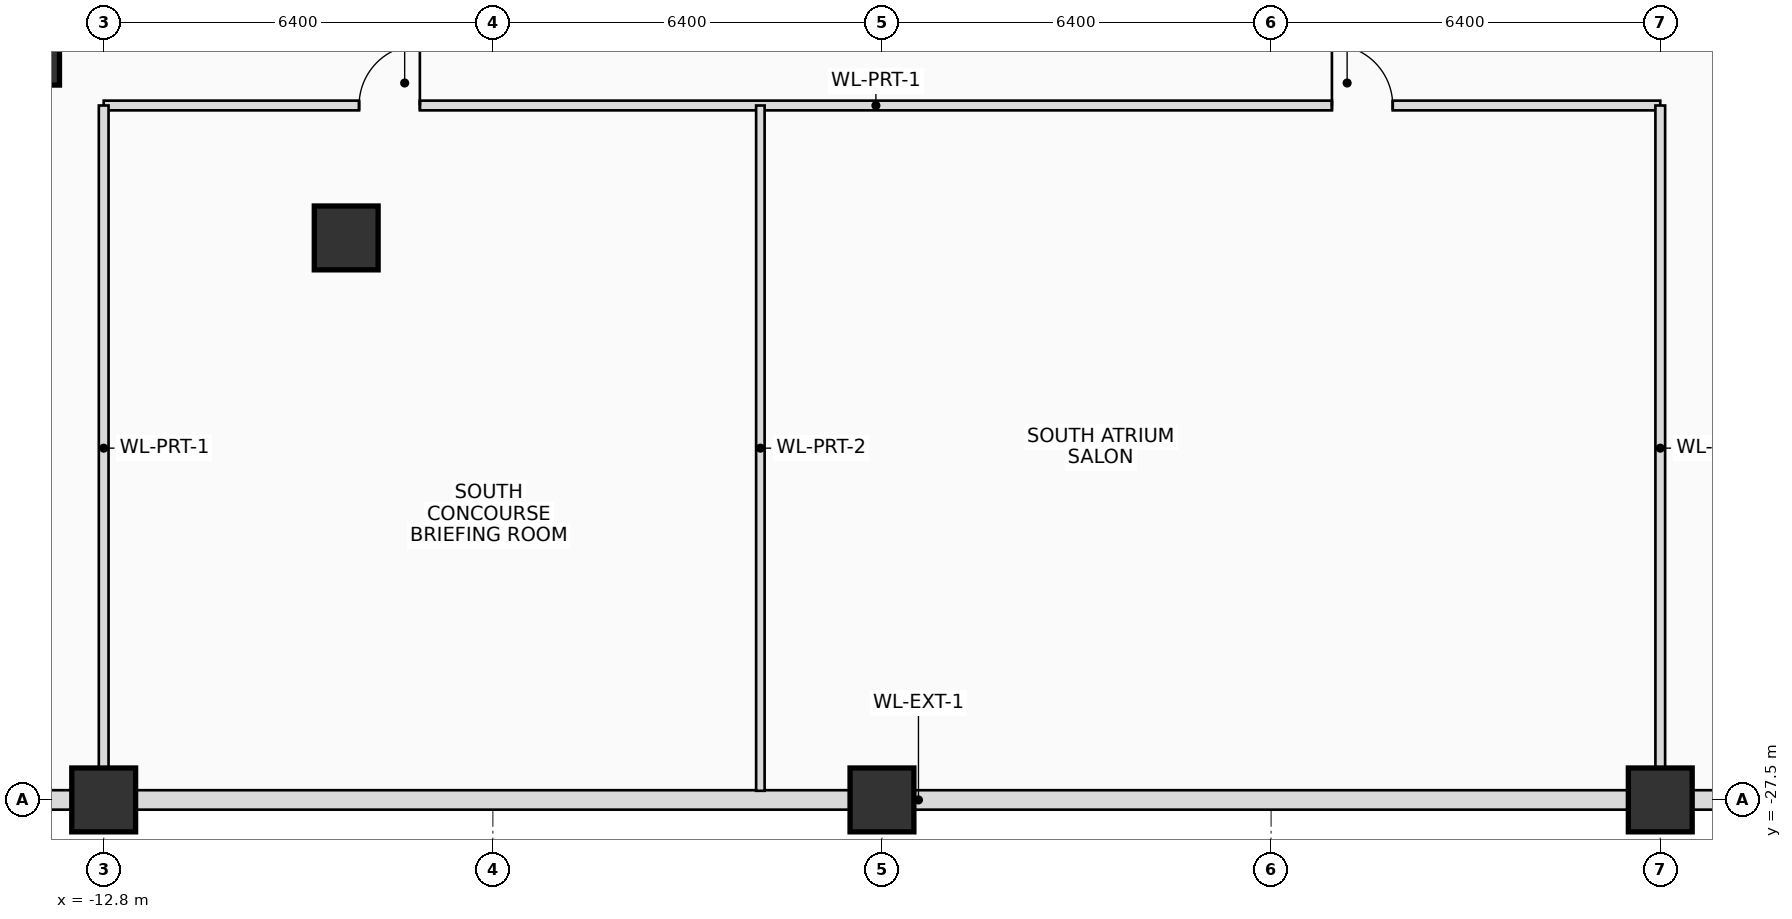
"""IFC4 building model, lengths in metres.
Left out: names, types, materials, properties, quantities, classifications, styles, units other than length and angle.
Written with IfcOpenShell. Run it as: python <this file> out.ifc"""

import sys

from ifc_helpers import new_model, si_unit, direction, frame, frame_2d, origin, origin_2d, place, context, subcontext, project, spatial, rectangle, extrude, source, transform, mapped, element, fill, save


model = new_model("IFC4")
c1 = context("Model", 3, precision=1e-05, world=origin(), true_north=direction((0.0, 1.0)))
c2 = subcontext(c1, "Body", "Model", "MODEL_VIEW")
j1 = project(units=[si_unit("LENGTHUNIT", "METRE"), si_unit("PLANEANGLEUNIT", "RADIAN")], contexts=[c1])
p1 = place(None, origin())
s1 = spatial("IfcSite", under=j1, at=p1, CompositionType="ELEMENT")
p2 = place(p1, origin())
s2 = spatial("IfcBuilding", under=s1, at=p2, CompositionType="ELEMENT")
p3 = place(p2, frame((0.0, 0.0, 4.5)))
s3 = spatial("IfcBuildingStorey", under=s2, at=p3, CompositionType="ELEMENT", Elevation=4.5)
m1 = source(origin(), c2, "Body", "SweptSolid", [
    extrude(rectangle(XDim=1.05, YDim=1.05, at=origin_2d()), origin(), (0.0, 0.0, 1.0), 3.9),
])
for number, where, z_axis, x_axis in (
    (1, (-12.8, -27.5, 0.0), (0.0, 0.0, 1.0), (1.0, 0.0, 0.0)),
    (2, (0.0, -27.5, 0.0), (0.0, 0.0, 1.0), (1.0, 0.0, 0.0)),
    (3, (12.8, -27.5, 0.0), (0.0, 0.0, 1.0), (1.0, 0.0, 0.0)),
    (4, (-8.812, -18.258, 0.0), (0.0, 0.0, 1.0), (1.0, 0.0, 0.0)),
    (5, (-14.052, -15.219, 0.0), (0.0, 0.0, 1.0), (1.0, 0.0, 0.0)),
):
    element("IfcColumn", number, at=place(p3, frame(where, z_axis=z_axis, x_axis=x_axis)), inside=s3, PredefinedType="COLUMN", context=c2, shape_type="MappedRepresentation", body=[
        mapped(m1, transform((0.0, 0.0, 0.0), scale=1.0)),
    ])
p4 = place(p3, frame((34.0, -27.5, 0.0), z_axis=(0.0, 0.0, 1.0), x_axis=(-1.0, 0.0, 0.0)))
e6 = element("IfcWall", 6, at=p4, inside=s3, PredefinedType="SOLIDWALL", context=c2, shape_type="SweptSolid", body=[
    extrude(rectangle(XDim=68.0, YDim=0.32, at=frame_2d((34.0, 0.0))), origin(), (0.0, 0.0, 1.0), 2.65),
])
p5 = place(p4, frame((16.0, 0.0, 0.65)))
e7 = element("IfcOpeningElement", 7, at=p5, cuts=e6, PredefinedType="OPENING", context=c2, shape_type="SweptSolid", body=[
    extrude(rectangle(XDim=1.8, YDim=1.8, at=frame_2d((0.9, 0.9))), frame((0.0, 0.17, 0.0), z_axis=(0.0, -1.0, 0.0), x_axis=(1.0, 0.0, 0.0)), (0.0, 0.0, 1.0), 0.34),
])
p6 = place(p4, frame((49.0, 0.0, 0.65)))
e8 = element("IfcOpeningElement", 8, at=p6, cuts=e6, PredefinedType="OPENING", context=c2, shape_type="SweptSolid", body=[
    extrude(rectangle(XDim=1.8, YDim=1.8, at=frame_2d((0.9, 0.9))), frame((0.0, 0.17, 0.0), z_axis=(0.0, -1.0, 0.0), x_axis=(1.0, 0.0, 0.0)), (0.0, 0.0, 1.0), 0.34),
])
p7 = place(p3, frame((-12.8, -16.08, 0.0), z_axis=(0.0, 0.0, 1.0), x_axis=(1.0, 0.0, 0.0)))
e9 = element("IfcWall", 9, at=p7, inside=s3, PredefinedType="PARTITIONING", context=c2, shape_type="SweptSolid", body=[
    extrude(rectangle(XDim=25.6, YDim=0.16, at=frame_2d((12.8, 0.0))), origin(), (0.0, 0.0, 1.0), 3.025),
])
p8 = place(p7, frame((4.2, 0.0, 0.0)))
e10 = element("IfcOpeningElement", 10, at=p8, cuts=e9, PredefinedType="OPENING", context=c2, shape_type="SweptSolid", body=[
    extrude(rectangle(XDim=1.0, YDim=2.25, at=frame_2d((0.5, 1.125))), frame((0.0, 0.09, 0.0), z_axis=(0.0, -1.0, 0.0), x_axis=(1.0, 0.0, 0.0)), (0.0, 0.0, 1.0), 0.18),
])
p9 = place(p7, frame((20.2, 0.0, 0.0)))
e11 = element("IfcOpeningElement", 11, at=p9, cuts=e9, PredefinedType="OPENING", context=c2, shape_type="SweptSolid", body=[
    extrude(rectangle(XDim=1.0, YDim=2.25, at=frame_2d((0.5, 1.125))), frame((0.0, 0.09, 0.0), z_axis=(0.0, -1.0, 0.0), x_axis=(1.0, 0.0, 0.0)), (0.0, 0.0, 1.0), 0.18),
])
for number, where, z_axis, x_axis in (
    (12, (-12.8, -27.35, 0.0), (0.0, 0.0, 1.0), (0.0, 1.0, 0.0)),
    (13, (12.8, -27.35, 0.0), (0.0, 0.0, 1.0), (0.0, 1.0, 0.0)),
):
    element("IfcWall", number, at=place(p3, frame(where, z_axis=z_axis, x_axis=x_axis)), inside=s3, PredefinedType="PARTITIONING", context=c2, shape_type="SweptSolid", body=[
        extrude(rectangle(XDim=11.27, YDim=0.16, at=frame_2d((5.635, 0.0))), origin(), (0.0, 0.0, 1.0), 3.025),
    ])
p10 = place(p3, frame((-2.0, -27.35, 0.0), z_axis=(0.0, 0.0, 1.0), x_axis=(0.0, 1.0, 0.0)))
e14 = element("IfcWall", 14, at=p10, inside=s3, PredefinedType="PARTITIONING", context=c2, shape_type="SweptSolid", body=[
    extrude(rectangle(XDim=11.27, YDim=0.14, at=frame_2d((5.635, 0.0))), origin(), (0.0, 0.0, 1.0), 3.57),
])
p11 = place(p8, origin())
e15 = element("IfcDoor", 15, at=p11, inside=s3, OperationType="SINGLE_SWING_RIGHT", PredefinedType="DOOR", context=c2, shape_type="SweptSolid", body=[
    extrude(rectangle(XDim=1.0, YDim=2.25, at=frame_2d((0.5, 1.125))), frame((0.0, 0.025, 0.0), z_axis=(0.0, -1.0, 0.0), x_axis=(1.0, 0.0, 0.0)), (0.0, 0.0, 1.0), 0.05),
])
fill(e10, e15)
p12 = place(p9, origin())
e16 = element("IfcDoor", 16, at=p12, inside=s3, OperationType="SINGLE_SWING_LEFT", PredefinedType="DOOR", context=c2, shape_type="SweptSolid", body=[
    extrude(rectangle(XDim=1.0, YDim=2.25, at=frame_2d((0.5, 1.125))), frame((0.0, 0.025, 0.0), z_axis=(0.0, -1.0, 0.0), x_axis=(1.0, 0.0, 0.0)), (0.0, 0.0, 1.0), 0.05),
])
fill(e11, e16)
save(model, sys.argv[1])
